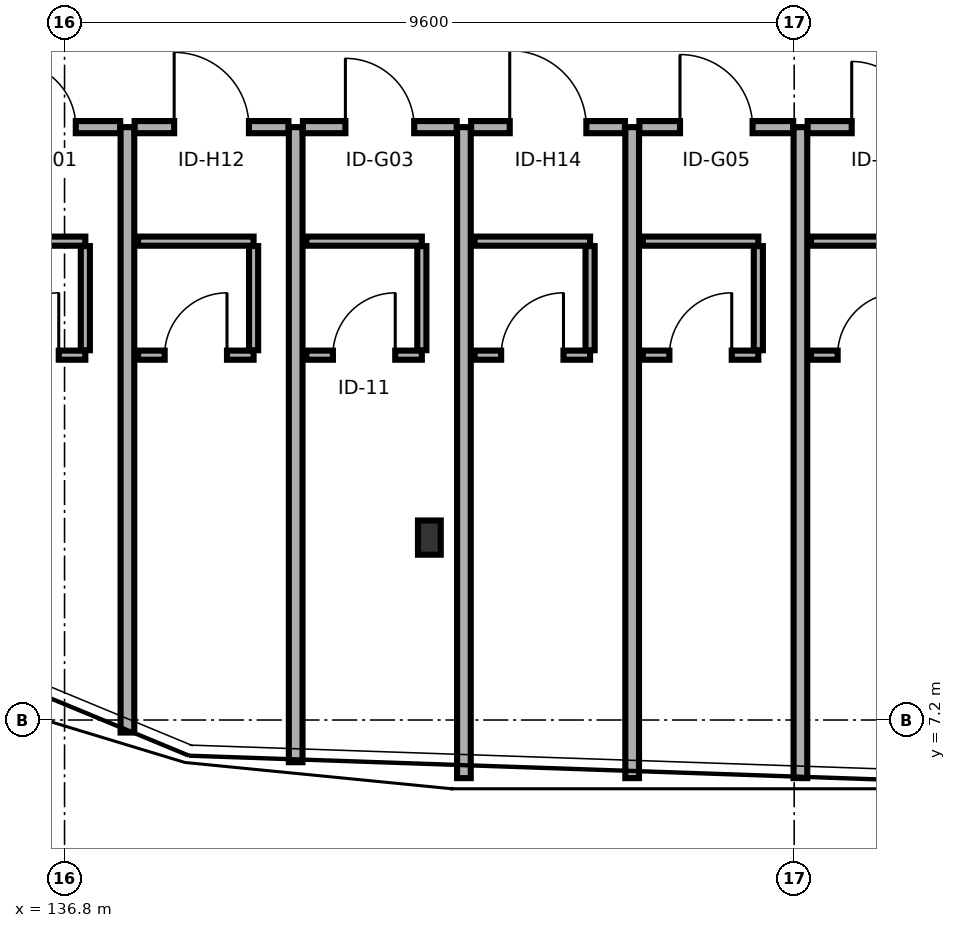
"""IFC4 building model, lengths in metres.
Left out: names, types, materials, properties, quantities, classifications, styles, units other than length and angle.
Written with IfcOpenShell. Run it as: python <this file> out.ifc"""

import sys

from ifc_helpers import new_model, si_unit, direction, frame, frame_2d, origin, origin_2d, place, context, subcontext, project, spatial, rectangle, i_section, extrude, element, fill, save


model = new_model("IFC4")
c1 = context("Model", 3, precision=1e-05, world=origin(), true_north=direction((0.0, 1.0)))
c2 = subcontext(c1, "Body", "Model", "MODEL_VIEW")
j1 = project(units=[si_unit("LENGTHUNIT", "METRE"), si_unit("PLANEANGLEUNIT", "RADIAN")], contexts=[c1])
p1 = place(None, origin())
s1 = spatial("IfcSite", under=j1, at=p1, CompositionType="ELEMENT")
p2 = place(p1, origin())
s2 = spatial("IfcBuilding", under=s1, at=p2, CompositionType="ELEMENT")
p3 = place(p2, frame((0.0, 0.0, 28.3)))
s3 = spatial("IfcBuildingStorey", under=s2, at=p3, CompositionType="ELEMENT", Elevation=28.3)
p4 = place(p3, frame((141.6, 9.6, 0.0), z_axis=(0.0, 0.0, 1.0), x_axis=(1.0, 0.0, 0.0)))
e1 = element("IfcColumn", 1, at=p4, inside=s3, PredefinedType="COLUMN", context=c2, shape_type="SweptSolid", body=[
    extrude(i_section(OverallWidth=0.3, OverallDepth=0.45, WebThickness=0.014, FlangeThickness=0.026, FilletRadius=0.027, at=origin_2d()), origin(), (0.0, 0.0, 1.0), 3.4),
])
p5 = place(p3, frame((135.509, 15.0, 0.0), z_axis=(0.0, 0.0, 1.0), x_axis=(1.0, 0.0, 0.0)))
e2 = element("IfcWall", 2, at=p5, inside=s3, PredefinedType="PARTITIONING", context=c2, shape_type="SweptSolid", body=[
    extrude(rectangle(XDim=2.024, YDim=0.16, at=frame_2d((1.012, 0.0))), origin(), (0.0, 0.0, 1.0), 2.71),
])
p6 = place(p5, frame((0.584, 0.0, 0.0)))
e3 = element("IfcOpeningElement", 3, at=p6, cuts=e2, PredefinedType="OPENING", context=c2, shape_type="SweptSolid", body=[
    extrude(rectangle(XDim=0.855, YDim=2.05, at=frame_2d((0.427, 1.025))), frame((0.0, 0.09, 0.0), z_axis=(0.0, -1.0, 0.0), x_axis=(1.0, 0.0, 0.0)), (0.0, 0.0, 1.0), 0.18),
])
p7 = place(p3, frame((135.554, 12.0, 0.0), z_axis=(0.0, 0.0, 1.0), x_axis=(1.0, 0.0, 0.0)))
e4 = element("IfcWall", 4, at=p7, inside=s3, PredefinedType="PARTITIONING", context=c2, shape_type="SweptSolid", body=[
    extrude(rectangle(XDim=1.52, YDim=0.12, at=frame_2d((0.76, 0.0))), origin(), (0.0, 0.0, 1.0), 3.175),
])
p8 = place(p7, frame((0.35, 0.0, 0.0)))
e5 = element("IfcOpeningElement", 5, at=p8, cuts=e4, PredefinedType="OPENING", context=c2, shape_type="SweptSolid", body=[
    extrude(rectangle(XDim=0.82, YDim=2.08, at=frame_2d((0.41, 1.04))), frame((0.0, 0.07, 0.0), z_axis=(0.0, -1.0, 0.0), x_axis=(1.0, 0.0, 0.0)), (0.0, 0.0, 1.0), 0.14),
])
p9 = place(p3, frame((135.554, 13.5, 0.0), z_axis=(0.0, 0.0, 1.0), x_axis=(1.0, 0.0, 0.0)))
e6 = element("IfcWall", 6, at=p9, inside=s3, PredefinedType="PARTITIONING", context=c2, shape_type="SweptSolid", body=[
    extrude(rectangle(XDim=1.52, YDim=0.12, at=frame_2d((0.76, 0.0))), origin(), (0.0, 0.0, 1.0), 2.71),
])
p10 = place(p3, frame((137.073, 12.065, 0.0), z_axis=(0.0, 0.0, 1.0), x_axis=(0.0, 1.0, 0.0)))
e7 = element("IfcWall", 7, at=p10, inside=s3, PredefinedType="PARTITIONING", context=c2, shape_type="SweptSolid", body=[
    extrude(rectangle(XDim=1.37, YDim=0.12, at=frame_2d((0.685, 0.0))), origin(), (0.0, 0.0, 1.0), 3.175),
])
p11 = place(p3, frame((137.627, 7.035, 0.0), z_axis=(0.0, 0.0, 1.0), x_axis=(0.0, 1.0, 0.0)))
e8 = element("IfcWall", 8, at=p11, inside=s3, PredefinedType="PARTITIONING", context=c2, shape_type="SweptSolid", body=[
    extrude(rectangle(XDim=7.965, YDim=0.18, at=frame_2d((3.982, 0.0))), origin(), (0.0, 0.0, 1.0), 2.66),
])
p12 = place(p3, frame((137.722, 15.0, 0.0), z_axis=(0.0, 0.0, 1.0), x_axis=(1.0, 0.0, 0.0)))
e9 = element("IfcWall", 9, at=p12, inside=s3, PredefinedType="PARTITIONING", context=c2, shape_type="SweptSolid", body=[
    extrude(rectangle(XDim=2.023, YDim=0.16, at=frame_2d((1.012, 0.0))), origin(), (0.0, 0.0, 1.0), 3.175),
])
p13 = place(p12, frame((0.52, 0.0, 0.0)))
e10 = element("IfcOpeningElement", 10, at=p13, cuts=e9, PredefinedType="OPENING", context=c2, shape_type="SweptSolid", body=[
    extrude(rectangle(XDim=0.984, YDim=2.07, at=frame_2d((0.492, 1.035))), frame((0.0, 0.09, 0.0), z_axis=(0.0, -1.0, 0.0), x_axis=(1.0, 0.0, 0.0)), (0.0, 0.0, 1.0), 0.18),
])
p14 = place(p3, frame((137.767, 12.0, 0.0), z_axis=(0.0, 0.0, 1.0), x_axis=(1.0, 0.0, 0.0)))
e11 = element("IfcWall", 11, at=p14, inside=s3, PredefinedType="PARTITIONING", context=c2, shape_type="SweptSolid", body=[
    extrude(rectangle(XDim=1.52, YDim=0.12, at=frame_2d((0.76, 0.0))), origin(), (0.0, 0.0, 1.0), 3.175),
])
p15 = place(p14, frame((0.35, 0.0, 0.0)))
e12 = element("IfcOpeningElement", 12, at=p15, cuts=e11, PredefinedType="OPENING", context=c2, shape_type="SweptSolid", body=[
    extrude(rectangle(XDim=0.82, YDim=2.08, at=frame_2d((0.41, 1.04))), frame((0.0, 0.07, 0.0), z_axis=(0.0, -1.0, 0.0), x_axis=(1.0, 0.0, 0.0)), (0.0, 0.0, 1.0), 0.14),
])
p16 = place(p3, frame((137.767, 13.5, 0.0), z_axis=(0.0, 0.0, 1.0), x_axis=(1.0, 0.0, 0.0)))
e13 = element("IfcWall", 13, at=p16, inside=s3, PredefinedType="PARTITIONING", context=c2, shape_type="SweptSolid", body=[
    extrude(rectangle(XDim=1.52, YDim=0.12, at=frame_2d((0.76, 0.0))), origin(), (0.0, 0.0, 1.0), 3.175),
])
p17 = place(p3, frame((139.287, 12.065, 0.0), z_axis=(0.0, 0.0, 1.0), x_axis=(0.0, 1.0, 0.0)))
e14 = element("IfcWall", 14, at=p17, inside=s3, PredefinedType="PARTITIONING", context=c2, shape_type="SweptSolid", body=[
    extrude(rectangle(XDim=1.37, YDim=0.12, at=frame_2d((0.685, 0.0))), origin(), (0.0, 0.0, 1.0), 3.175),
])
p18 = place(p3, frame((139.841, 6.645, 0.0), z_axis=(0.0, 0.0, 1.0), x_axis=(0.0, 1.0, 0.0)))
e15 = element("IfcWall", 15, at=p18, inside=s3, PredefinedType="PARTITIONING", context=c2, shape_type="SweptSolid", body=[
    extrude(rectangle(XDim=8.355, YDim=0.18, at=frame_2d((4.178, 0.0))), origin(), (0.0, 0.0, 1.0), 2.66),
])
p19 = place(p3, frame((139.936, 15.0, 0.0), z_axis=(0.0, 0.0, 1.0), x_axis=(1.0, 0.0, 0.0)))
e16 = element("IfcWall", 16, at=p19, inside=s3, PredefinedType="PARTITIONING", context=c2, shape_type="SweptSolid", body=[
    extrude(rectangle(XDim=2.024, YDim=0.16, at=frame_2d((1.012, 0.0))), origin(), (0.0, 0.0, 1.0), 2.71),
])
p20 = place(p19, frame((0.559, 0.0, 0.0)))
e17 = element("IfcOpeningElement", 17, at=p20, cuts=e16, PredefinedType="OPENING", context=c2, shape_type="SweptSolid", body=[
    extrude(rectangle(XDim=0.905, YDim=2.05, at=frame_2d((0.453, 1.025))), frame((0.0, 0.09, 0.0), z_axis=(0.0, -1.0, 0.0), x_axis=(1.0, 0.0, 0.0)), (0.0, 0.0, 1.0), 0.18),
])
p21 = place(p3, frame((139.981, 12.0, 0.0), z_axis=(0.0, 0.0, 1.0), x_axis=(1.0, 0.0, 0.0)))
e18 = element("IfcWall", 18, at=p21, inside=s3, PredefinedType="PARTITIONING", context=c2, shape_type="SweptSolid", body=[
    extrude(rectangle(XDim=1.52, YDim=0.12, at=frame_2d((0.76, 0.0))), origin(), (0.0, 0.0, 1.0), 2.71),
])
p22 = place(p21, frame((0.35, 0.0, 0.0)))
e19 = element("IfcOpeningElement", 19, at=p22, cuts=e18, PredefinedType="OPENING", context=c2, shape_type="SweptSolid", body=[
    extrude(rectangle(XDim=0.82, YDim=2.08, at=frame_2d((0.41, 1.04))), frame((0.0, 0.07, 0.0), z_axis=(0.0, -1.0, 0.0), x_axis=(1.0, 0.0, 0.0)), (0.0, 0.0, 1.0), 0.14),
])
p23 = place(p3, frame((139.981, 13.5, 0.0), z_axis=(0.0, 0.0, 1.0), x_axis=(1.0, 0.0, 0.0)))
e20 = element("IfcWall", 20, at=p23, inside=s3, PredefinedType="PARTITIONING", context=c2, shape_type="SweptSolid", body=[
    extrude(rectangle(XDim=1.52, YDim=0.12, at=frame_2d((0.76, 0.0))), origin(), (0.0, 0.0, 1.0), 2.71),
])
p24 = place(p3, frame((141.501, 12.065, 0.0), z_axis=(0.0, 0.0, 1.0), x_axis=(0.0, 1.0, 0.0)))
e21 = element("IfcWall", 21, at=p24, inside=s3, PredefinedType="PARTITIONING", context=c2, shape_type="SweptSolid", body=[
    extrude(rectangle(XDim=1.37, YDim=0.12, at=frame_2d((0.685, 0.0))), origin(), (0.0, 0.0, 1.0), 2.71),
])
p25 = place(p3, frame((142.054, 6.436, 0.0), z_axis=(0.0, 0.0, 1.0), x_axis=(0.0, 1.0, 0.0)))
e22 = element("IfcWall", 22, at=p25, inside=s3, PredefinedType="PARTITIONING", context=c2, shape_type="SweptSolid", body=[
    extrude(rectangle(XDim=8.564, YDim=0.18, at=frame_2d((4.282, 0.0))), origin(), (0.0, 0.0, 1.0), 2.66),
])
p26 = place(p3, frame((142.149, 15.0, 0.0), z_axis=(0.0, 0.0, 1.0), x_axis=(1.0, 0.0, 0.0)))
e23 = element("IfcWall", 23, at=p26, inside=s3, PredefinedType="PARTITIONING", context=c2, shape_type="SweptSolid", body=[
    extrude(rectangle(XDim=2.024, YDim=0.16, at=frame_2d((1.012, 0.0))), origin(), (0.0, 0.0, 1.0), 3.175),
])
p27 = place(p26, frame((0.508, 0.0, 0.0)))
e24 = element("IfcOpeningElement", 24, at=p27, cuts=e23, PredefinedType="OPENING", context=c2, shape_type="SweptSolid", body=[
    extrude(rectangle(XDim=1.008, YDim=2.13, at=frame_2d((0.504, 1.065))), frame((0.0, 0.09, 0.0), z_axis=(0.0, -1.0, 0.0), x_axis=(1.0, 0.0, 0.0)), (0.0, 0.0, 1.0), 0.18),
])
p28 = place(p3, frame((142.195, 12.0, 0.0), z_axis=(0.0, 0.0, 1.0), x_axis=(1.0, 0.0, 0.0)))
e25 = element("IfcWall", 25, at=p28, inside=s3, PredefinedType="PARTITIONING", context=c2, shape_type="SweptSolid", body=[
    extrude(rectangle(XDim=1.52, YDim=0.12, at=frame_2d((0.76, 0.0))), origin(), (0.0, 0.0, 1.0), 3.175),
])
p29 = place(p28, frame((0.35, 0.0, 0.0)))
e26 = element("IfcOpeningElement", 26, at=p29, cuts=e25, PredefinedType="OPENING", context=c2, shape_type="SweptSolid", body=[
    extrude(rectangle(XDim=0.82, YDim=2.08, at=frame_2d((0.41, 1.04))), frame((0.0, 0.07, 0.0), z_axis=(0.0, -1.0, 0.0), x_axis=(1.0, 0.0, 0.0)), (0.0, 0.0, 1.0), 0.14),
])
p30 = place(p3, frame((142.195, 13.5, 0.0), z_axis=(0.0, 0.0, 1.0), x_axis=(1.0, 0.0, 0.0)))
e27 = element("IfcWall", 27, at=p30, inside=s3, PredefinedType="PARTITIONING", context=c2, shape_type="SweptSolid", body=[
    extrude(rectangle(XDim=1.52, YDim=0.12, at=frame_2d((0.76, 0.0))), origin(), (0.0, 0.0, 1.0), 3.175),
])
p31 = place(p3, frame((143.715, 12.065, 0.0), z_axis=(0.0, 0.0, 1.0), x_axis=(0.0, 1.0, 0.0)))
e28 = element("IfcWall", 28, at=p31, inside=s3, PredefinedType="PARTITIONING", context=c2, shape_type="SweptSolid", body=[
    extrude(rectangle(XDim=1.37, YDim=0.12, at=frame_2d((0.685, 0.0))), origin(), (0.0, 0.0, 1.0), 3.175),
])
p32 = place(p3, frame((144.268, 6.436, 0.0), z_axis=(0.0, 0.0, 1.0), x_axis=(0.0, 1.0, 0.0)))
e29 = element("IfcWall", 29, at=p32, inside=s3, PredefinedType="PARTITIONING", context=c2, shape_type="SweptSolid", body=[
    extrude(rectangle(XDim=8.564, YDim=0.18, at=frame_2d((4.282, 0.0))), origin(), (0.0, 0.0, 1.0), 2.66),
])
p33 = place(p3, frame((144.363, 15.0, 0.0), z_axis=(0.0, 0.0, 1.0), x_axis=(1.0, 0.0, 0.0)))
e30 = element("IfcWall", 30, at=p33, inside=s3, PredefinedType="PARTITIONING", context=c2, shape_type="SweptSolid", body=[
    extrude(rectangle(XDim=2.023, YDim=0.16, at=frame_2d((1.012, 0.0))), origin(), (0.0, 0.0, 1.0), 3.175),
])
p34 = place(p33, frame((0.534, 0.0, 0.0)))
e31 = element("IfcOpeningElement", 31, at=p34, cuts=e30, PredefinedType="OPENING", context=c2, shape_type="SweptSolid", body=[
    extrude(rectangle(XDim=0.955, YDim=2.05, at=frame_2d((0.478, 1.025))), frame((0.0, 0.09, 0.0), z_axis=(0.0, -1.0, 0.0), x_axis=(1.0, 0.0, 0.0)), (0.0, 0.0, 1.0), 0.18),
])
p35 = place(p3, frame((144.408, 12.0, 0.0), z_axis=(0.0, 0.0, 1.0), x_axis=(1.0, 0.0, 0.0)))
e32 = element("IfcWall", 32, at=p35, inside=s3, PredefinedType="PARTITIONING", context=c2, shape_type="SweptSolid", body=[
    extrude(rectangle(XDim=1.52, YDim=0.12, at=frame_2d((0.76, 0.0))), origin(), (0.0, 0.0, 1.0), 3.175),
])
p36 = place(p35, frame((0.35, 0.0, 0.0)))
e33 = element("IfcOpeningElement", 33, at=p36, cuts=e32, PredefinedType="OPENING", context=c2, shape_type="SweptSolid", body=[
    extrude(rectangle(XDim=0.82, YDim=2.08, at=frame_2d((0.41, 1.04))), frame((0.0, 0.07, 0.0), z_axis=(0.0, -1.0, 0.0), x_axis=(1.0, 0.0, 0.0)), (0.0, 0.0, 1.0), 0.14),
])
p37 = place(p3, frame((144.408, 13.5, 0.0), z_axis=(0.0, 0.0, 1.0), x_axis=(1.0, 0.0, 0.0)))
e34 = element("IfcWall", 34, at=p37, inside=s3, PredefinedType="PARTITIONING", context=c2, shape_type="SweptSolid", body=[
    extrude(rectangle(XDim=1.52, YDim=0.12, at=frame_2d((0.76, 0.0))), origin(), (0.0, 0.0, 1.0), 3.175),
])
p38 = place(p3, frame((145.928, 12.065, 0.0), z_axis=(0.0, 0.0, 1.0), x_axis=(0.0, 1.0, 0.0)))
e35 = element("IfcWall", 35, at=p38, inside=s3, PredefinedType="PARTITIONING", context=c2, shape_type="SweptSolid", body=[
    extrude(rectangle(XDim=1.37, YDim=0.12, at=frame_2d((0.685, 0.0))), origin(), (0.0, 0.0, 1.0), 3.175),
])
p39 = place(p3, frame((146.482, 6.436, 0.0), z_axis=(0.0, 0.0, 1.0), x_axis=(0.0, 1.0, 0.0)))
e36 = element("IfcWall", 36, at=p39, inside=s3, PredefinedType="PARTITIONING", context=c2, shape_type="SweptSolid", body=[
    extrude(rectangle(XDim=8.564, YDim=0.18, at=frame_2d((4.282, 0.0))), origin(), (0.0, 0.0, 1.0), 2.66),
])
p40 = place(p3, frame((146.577, 15.0, 0.0), z_axis=(0.0, 0.0, 1.0), x_axis=(1.0, 0.0, 0.0)))
e37 = element("IfcWall", 37, at=p40, inside=s3, PredefinedType="PARTITIONING", context=c2, shape_type="SweptSolid", body=[
    extrude(rectangle(XDim=2.024, YDim=0.16, at=frame_2d((1.012, 0.0))), origin(), (0.0, 0.0, 1.0), 3.175),
])
p41 = place(p40, frame((0.58, 0.0, 0.0)))
e38 = element("IfcOpeningElement", 38, at=p41, cuts=e37, PredefinedType="OPENING", context=c2, shape_type="SweptSolid", body=[
    extrude(rectangle(XDim=0.864, YDim=2.13, at=frame_2d((0.432, 1.065))), frame((0.0, 0.09, 0.0), z_axis=(0.0, -1.0, 0.0), x_axis=(1.0, 0.0, 0.0)), (0.0, 0.0, 1.0), 0.18),
])
p42 = place(p3, frame((146.622, 12.0, 0.0), z_axis=(0.0, 0.0, 1.0), x_axis=(1.0, 0.0, 0.0)))
e39 = element("IfcWall", 39, at=p42, inside=s3, PredefinedType="PARTITIONING", context=c2, shape_type="SweptSolid", body=[
    extrude(rectangle(XDim=1.52, YDim=0.12, at=frame_2d((0.76, 0.0))), origin(), (0.0, 0.0, 1.0), 3.175),
])
p43 = place(p42, frame((0.35, 0.0, 0.0)))
e40 = element("IfcOpeningElement", 40, at=p43, cuts=e39, PredefinedType="OPENING", context=c2, shape_type="SweptSolid", body=[
    extrude(rectangle(XDim=0.82, YDim=2.08, at=frame_2d((0.41, 1.04))), frame((0.0, 0.07, 0.0), z_axis=(0.0, -1.0, 0.0), x_axis=(1.0, 0.0, 0.0)), (0.0, 0.0, 1.0), 0.14),
])
p44 = place(p3, frame((146.622, 13.5, 0.0), z_axis=(0.0, 0.0, 1.0), x_axis=(1.0, 0.0, 0.0)))
e41 = element("IfcWall", 41, at=p44, inside=s3, PredefinedType="PARTITIONING", context=c2, shape_type="SweptSolid", body=[
    extrude(rectangle(XDim=1.52, YDim=0.12, at=frame_2d((0.76, 0.0))), origin(), (0.0, 0.0, 1.0), 3.175),
])
p45 = place(p6, origin())
e42 = element("IfcDoor", 42, at=p45, inside=s3, OperationType="SINGLE_SWING_LEFT", PredefinedType="DOOR", context=c2, shape_type="SweptSolid", body=[
    extrude(rectangle(XDim=0.855, YDim=2.05, at=frame_2d((0.427, 1.025))), frame((0.0, 0.025, 0.0), z_axis=(0.0, -1.0, 0.0), x_axis=(1.0, 0.0, 0.0)), (0.0, 0.0, 1.0), 0.05),
])
fill(e3, e42)
p46 = place(p8, origin())
e43 = element("IfcDoor", 43, at=p46, inside=s3, OperationType="SINGLE_SWING_RIGHT", PredefinedType="DOOR", context=c2, shape_type="SweptSolid", body=[
    extrude(rectangle(XDim=0.82, YDim=2.08, at=frame_2d((0.41, 1.04))), frame((0.0, 0.025, 0.0), z_axis=(0.0, -1.0, 0.0), x_axis=(1.0, 0.0, 0.0)), (0.0, 0.0, 1.0), 0.05),
])
fill(e5, e43)
p47 = place(p13, origin())
e44 = element("IfcDoor", 44, at=p47, inside=s3, OperationType="SINGLE_SWING_LEFT", PredefinedType="DOOR", context=c2, shape_type="SweptSolid", body=[
    extrude(rectangle(XDim=0.984, YDim=2.07, at=frame_2d((0.492, 1.035))), frame((0.0, 0.025, 0.0), z_axis=(0.0, -1.0, 0.0), x_axis=(1.0, 0.0, 0.0)), (0.0, 0.0, 1.0), 0.05),
])
fill(e10, e44)
p48 = place(p15, origin())
e45 = element("IfcDoor", 45, at=p48, inside=s3, OperationType="SINGLE_SWING_RIGHT", PredefinedType="DOOR", context=c2, shape_type="SweptSolid", body=[
    extrude(rectangle(XDim=0.82, YDim=2.08, at=frame_2d((0.41, 1.04))), frame((0.0, 0.025, 0.0), z_axis=(0.0, -1.0, 0.0), x_axis=(1.0, 0.0, 0.0)), (0.0, 0.0, 1.0), 0.05),
])
fill(e12, e45)
p49 = place(p20, origin())
e46 = element("IfcDoor", 46, at=p49, inside=s3, OperationType="SINGLE_SWING_LEFT", PredefinedType="DOOR", context=c2, shape_type="SweptSolid", body=[
    extrude(rectangle(XDim=0.905, YDim=2.05, at=frame_2d((0.453, 1.025))), frame((0.0, 0.025, 0.0), z_axis=(0.0, -1.0, 0.0), x_axis=(1.0, 0.0, 0.0)), (0.0, 0.0, 1.0), 0.05),
])
fill(e17, e46)
p50 = place(p22, origin())
e47 = element("IfcDoor", 47, at=p50, inside=s3, OperationType="SINGLE_SWING_RIGHT", PredefinedType="DOOR", context=c2, shape_type="SweptSolid", body=[
    extrude(rectangle(XDim=0.82, YDim=2.08, at=frame_2d((0.41, 1.04))), frame((0.0, 0.025, 0.0), z_axis=(0.0, -1.0, 0.0), x_axis=(1.0, 0.0, 0.0)), (0.0, 0.0, 1.0), 0.05),
])
fill(e19, e47)
p51 = place(p27, origin())
e48 = element("IfcDoor", 48, at=p51, inside=s3, OperationType="SINGLE_SWING_LEFT", PredefinedType="DOOR", context=c2, shape_type="SweptSolid", body=[
    extrude(rectangle(XDim=1.008, YDim=2.13, at=frame_2d((0.504, 1.065))), frame((0.0, 0.025, 0.0), z_axis=(0.0, -1.0, 0.0), x_axis=(1.0, 0.0, 0.0)), (0.0, 0.0, 1.0), 0.05),
])
fill(e24, e48)
p52 = place(p29, origin())
e49 = element("IfcDoor", 49, at=p52, inside=s3, OperationType="SINGLE_SWING_RIGHT", PredefinedType="DOOR", context=c2, shape_type="SweptSolid", body=[
    extrude(rectangle(XDim=0.82, YDim=2.08, at=frame_2d((0.41, 1.04))), frame((0.0, 0.025, 0.0), z_axis=(0.0, -1.0, 0.0), x_axis=(1.0, 0.0, 0.0)), (0.0, 0.0, 1.0), 0.05),
])
fill(e26, e49)
p53 = place(p34, origin())
e50 = element("IfcDoor", 50, at=p53, inside=s3, OperationType="SINGLE_SWING_LEFT", PredefinedType="DOOR", context=c2, shape_type="SweptSolid", body=[
    extrude(rectangle(XDim=0.955, YDim=2.05, at=frame_2d((0.478, 1.025))), frame((0.0, 0.025, 0.0), z_axis=(0.0, -1.0, 0.0), x_axis=(1.0, 0.0, 0.0)), (0.0, 0.0, 1.0), 0.05),
])
fill(e31, e50)
p54 = place(p36, origin())
e51 = element("IfcDoor", 51, at=p54, inside=s3, OperationType="SINGLE_SWING_RIGHT", PredefinedType="DOOR", context=c2, shape_type="SweptSolid", body=[
    extrude(rectangle(XDim=0.82, YDim=2.08, at=frame_2d((0.41, 1.04))), frame((0.0, 0.025, 0.0), z_axis=(0.0, -1.0, 0.0), x_axis=(1.0, 0.0, 0.0)), (0.0, 0.0, 1.0), 0.05),
])
fill(e33, e51)
p55 = place(p41, origin())
e52 = element("IfcDoor", 52, at=p55, inside=s3, OperationType="SINGLE_SWING_LEFT", PredefinedType="DOOR", context=c2, shape_type="SweptSolid", body=[
    extrude(rectangle(XDim=0.864, YDim=2.13, at=frame_2d((0.432, 1.065))), frame((0.0, 0.025, 0.0), z_axis=(0.0, -1.0, 0.0), x_axis=(1.0, 0.0, 0.0)), (0.0, 0.0, 1.0), 0.05),
])
fill(e38, e52)
p56 = place(p43, origin())
e53 = element("IfcDoor", 53, at=p56, inside=s3, OperationType="SINGLE_SWING_RIGHT", PredefinedType="DOOR", context=c2, shape_type="SweptSolid", body=[
    extrude(rectangle(XDim=0.82, YDim=2.08, at=frame_2d((0.41, 1.04))), frame((0.0, 0.025, 0.0), z_axis=(0.0, -1.0, 0.0), x_axis=(1.0, 0.0, 0.0)), (0.0, 0.0, 1.0), 0.05),
])
fill(e40, e53)
save(model, sys.argv[1])
